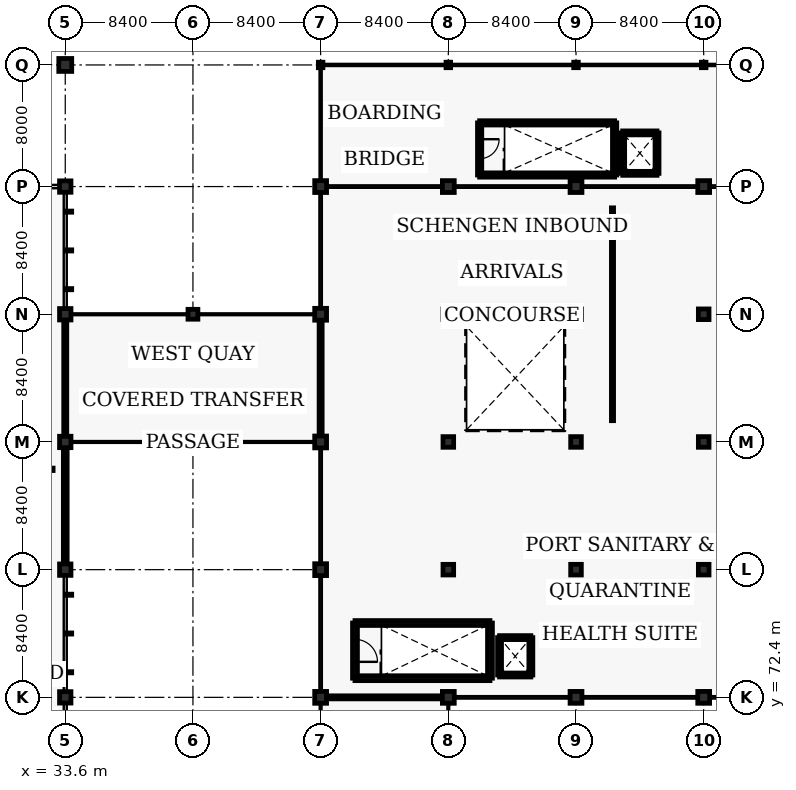
"""IFC4 building model, lengths in metres.
Left out: names, types, materials, properties, quantities, classifications, styles, units other than length and angle.
Written with IfcOpenShell. Run it as: python <this file> out.ifc"""

import sys

from ifc_helpers import new_model, si_unit, direction, frame, frame_2d, origin, origin_2d, place, context, subcontext, project, spatial, rectangle, circle, i_section, extrude, element, fill, save


model = new_model("IFC4")
c1 = context("Model", 3, precision=1e-05, world=origin(), true_north=direction((0.0, 1.0)))
c2 = subcontext(c1, "Body", "Model", "MODEL_VIEW")
j1 = project(units=[si_unit("LENGTHUNIT", "METRE"), si_unit("PLANEANGLEUNIT", "RADIAN")], contexts=[c1])
p1 = place(None, origin())
s1 = spatial("IfcSite", under=j1, at=p1, CompositionType="ELEMENT")
p2 = place(p1, origin())
s2 = spatial("IfcBuilding", under=s1, at=p2, CompositionType="ELEMENT")
p3 = place(p2, frame((0.0, 0.0, 5.44)))
s3 = spatial("IfcBuildingStorey", under=s2, at=p3, CompositionType="ELEMENT", Elevation=5.44)
for number, where, z_axis, x_axis in (
    (1, (42.0, 89.2, 0.0), (0.0, 0.0, 1.0), (1.0, 0.0, 0.0)),
    (2, (42.0, 97.6, 0.0), (0.0, 0.0, 1.0), (1.0, 0.0, 0.0)),
):
    element("IfcColumn", number, at=place(p3, frame(where, z_axis=z_axis, x_axis=x_axis)), inside=s3, PredefinedType="COLUMN", context=c2, shape_type="SweptSolid", body=[
        extrude(circle(Radius=0.325, at=origin_2d()), origin(), (0.0, 0.0, 1.0), 4.16),
    ])
for number, where, z_axis, x_axis in (
    (3, (33.6, 72.4, 0.0), (0.0, 0.0, 1.0), (1.0, 0.0, 0.0)),
    (4, (33.6, 80.8, 0.0), (0.0, 0.0, 1.0), (1.0, 0.0, 0.0)),
    (5, (33.6, 89.2, 0.0), (0.0, 0.0, 1.0), (1.0, 0.0, 0.0)),
    (6, (33.6, 97.6, 0.0), (0.0, 0.0, 1.0), (1.0, 0.0, 0.0)),
    (7, (33.6, 106.0, 0.0), (0.0, 0.0, 1.0), (1.0, 0.0, 0.0)),
):
    element("IfcColumn", number, at=place(p3, frame(where, z_axis=z_axis, x_axis=x_axis)), inside=s3, PredefinedType="COLUMN", context=c2, shape_type="SweptSolid", body=[
        extrude(rectangle(XDim=0.75, YDim=0.75, at=origin_2d()), origin(), (0.0, 0.0, 1.0), 4.16),
    ])
p4 = place(p3, frame((33.6, 114.0, 0.0), z_axis=(0.0, 0.0, 1.0), x_axis=(1.0, 0.0, 0.0)))
e8 = element("IfcColumn", 8, at=p4, inside=s3, PredefinedType="COLUMN", context=c2, shape_type="SweptSolid", body=[
    extrude(circle(Radius=0.425, at=origin_2d()), origin(), (0.0, 0.0, 1.0), 4.16),
])
for number, where, z_axis, x_axis in (
    (9, (50.4, 72.4, 0.0), (0.0, 0.0, 1.0), (1.0, 0.0, 0.0)),
    (10, (50.4, 80.8, 0.0), (0.0, 0.0, 1.0), (1.0, 0.0, 0.0)),
    (11, (50.4, 89.2, 0.0), (0.0, 0.0, 1.0), (1.0, 0.0, 0.0)),
    (12, (50.4, 97.6, 0.0), (0.0, 0.0, 1.0), (1.0, 0.0, 0.0)),
    (13, (50.4, 106.0, 0.0), (0.0, 0.0, 1.0), (1.0, 0.0, 0.0)),
    (14, (58.8, 72.4, 0.0), (0.0, 0.0, 1.0), (1.0, 0.0, 0.0)),
):
    element("IfcColumn", number, at=place(p3, frame(where, z_axis=z_axis, x_axis=x_axis)), inside=s3, PredefinedType="COLUMN", context=c2, shape_type="SweptSolid", body=[
        extrude(circle(Radius=0.39, at=origin_2d()), origin(), (0.0, 0.0, 1.0), 4.16),
    ])
for number, where, z_axis, x_axis in (
    (15, (58.8, 80.8, 0.0), (0.0, 0.0, 1.0), (1.0, 0.0, 0.0)),
    (16, (58.8, 89.2, 0.0), (0.0, 0.0, 1.0), (1.0, 0.0, 0.0)),
    (17, (58.8, 97.6, 0.0), (0.0, 0.0, 1.0), (1.0, 0.0, 0.0)),
):
    element("IfcColumn", number, at=place(p3, frame(where, z_axis=z_axis, x_axis=x_axis)), inside=s3, PredefinedType="COLUMN", context=c2, shape_type="SweptSolid", body=[
        extrude(rectangle(XDim=0.7, YDim=0.7, at=origin_2d()), origin(), (0.0, 0.0, 1.0), 4.16),
    ])
for number, where, z_axis, x_axis in (
    (18, (58.8, 106.0, 0.0), (0.0, 0.0, 1.0), (1.0, 0.0, 0.0)),
    (19, (67.2, 72.4, 0.0), (0.0, 0.0, 1.0), (1.0, 0.0, 0.0)),
):
    element("IfcColumn", number, at=place(p3, frame(where, z_axis=z_axis, x_axis=x_axis)), inside=s3, PredefinedType="COLUMN", context=c2, shape_type="SweptSolid", body=[
        extrude(circle(Radius=0.39, at=origin_2d()), origin(), (0.0, 0.0, 1.0), 4.16),
    ])
for number, where, z_axis, x_axis in (
    (20, (67.2, 80.8, 0.0), (0.0, 0.0, 1.0), (1.0, 0.0, 0.0)),
    (21, (67.2, 89.2, 0.0), (0.0, 0.0, 1.0), (1.0, 0.0, 0.0)),
    (22, (67.2, 97.6, 0.0), (0.0, 0.0, 1.0), (1.0, 0.0, 0.0)),
):
    element("IfcColumn", number, at=place(p3, frame(where, z_axis=z_axis, x_axis=x_axis)), inside=s3, PredefinedType="COLUMN", context=c2, shape_type="SweptSolid", body=[
        extrude(rectangle(XDim=0.7, YDim=0.7, at=origin_2d()), origin(), (0.0, 0.0, 1.0), 4.16),
    ])
for number, where, z_axis, x_axis in (
    (23, (67.2, 106.0, 0.0), (0.0, 0.0, 1.0), (1.0, 0.0, 0.0)),
    (24, (75.6, 72.4, 0.0), (0.0, 0.0, 1.0), (1.0, 0.0, 0.0)),
):
    element("IfcColumn", number, at=place(p3, frame(where, z_axis=z_axis, x_axis=x_axis)), inside=s3, PredefinedType="COLUMN", context=c2, shape_type="SweptSolid", body=[
        extrude(circle(Radius=0.39, at=origin_2d()), origin(), (0.0, 0.0, 1.0), 4.16),
    ])
for number, where, z_axis, x_axis in (
    (25, (75.6, 80.8, 0.0), (0.0, 0.0, 1.0), (1.0, 0.0, 0.0)),
    (26, (75.6, 89.2, 0.0), (0.0, 0.0, 1.0), (1.0, 0.0, 0.0)),
    (27, (75.6, 97.6, 0.0), (0.0, 0.0, 1.0), (1.0, 0.0, 0.0)),
):
    element("IfcColumn", number, at=place(p3, frame(where, z_axis=z_axis, x_axis=x_axis)), inside=s3, PredefinedType="COLUMN", context=c2, shape_type="SweptSolid", body=[
        extrude(rectangle(XDim=0.7, YDim=0.7, at=origin_2d()), origin(), (0.0, 0.0, 1.0), 4.16),
    ])
p5 = place(p3, frame((75.6, 106.0, 0.0), z_axis=(0.0, 0.0, 1.0), x_axis=(1.0, 0.0, 0.0)))
e28 = element("IfcColumn", 28, at=p5, inside=s3, PredefinedType="COLUMN", context=c2, shape_type="SweptSolid", body=[
    extrude(circle(Radius=0.39, at=origin_2d()), origin(), (0.0, 0.0, 1.0), 4.16),
])
for number, where, z_axis, x_axis in (
    (29, (50.4, 114.0, 0.0), (0.0, 0.0, 1.0), (1.0, 0.0, 0.0)),
    (30, (58.8, 114.0, 0.0), (0.0, 0.0, 1.0), (1.0, 0.0, 0.0)),
    (31, (67.2, 114.0, 0.0), (0.0, 0.0, 1.0), (1.0, 0.0, 0.0)),
    (32, (75.6, 114.0, 0.0), (0.0, 0.0, 1.0), (1.0, 0.0, 0.0)),
):
    element("IfcColumn", number, at=place(p3, frame(where, z_axis=z_axis, x_axis=x_axis)), inside=s3, PredefinedType="COLUMN", context=c2, shape_type="SweptSolid", body=[
        extrude(i_section(OverallWidth=0.3, OverallDepth=0.36, WebThickness=0.012, FlangeThickness=0.022, FilletRadius=0.027, at=origin_2d()), origin(), (0.0, 0.0, 1.0), 5.468),
    ])
p6 = place(p3, frame((33.6, 81.175, 0.0), z_axis=(0.0, 0.0, 1.0), x_axis=(0.0, 1.0, 0.0)))
e33 = element("IfcWall", 33, at=p6, inside=s3, PredefinedType="SOLIDWALL", context=c2, shape_type="SweptSolid", body=[
    extrude(rectangle(XDim=7.65, YDim=0.25, at=frame_2d((3.825, 0.0))), origin(), (0.0, 0.0, 1.0), 3.515),
])
for number, where, z_axis, x_axis in (
    (34, (52.66, 73.66, 0.0), (0.0, 0.0, 1.0), (1.0, 0.0, 0.0)),
    (35, (52.66, 77.29, 0.0), (0.0, 0.0, 1.0), (1.0, 0.0, 0.0)),
):
    element("IfcWall", number, at=place(p3, frame(where, z_axis=z_axis, x_axis=x_axis)), inside=s3, PredefinedType="SHEAR", context=c2, shape_type="SweptSolid", body=[
        extrude(rectangle(XDim=8.88, YDim=0.32, at=frame_2d((4.44, 0.0))), origin(), (0.0, 0.0, 1.0), 4.16),
    ])
p7 = place(p3, frame((52.66, 77.29, 0.0), z_axis=(0.0, 0.0, 1.0), x_axis=(0.0, -1.0, 0.0)))
e36 = element("IfcWall", 36, at=p7, inside=s3, PredefinedType="SHEAR", context=c2, shape_type="SweptSolid", body=[
    extrude(rectangle(XDim=3.63, YDim=0.32, at=frame_2d((1.815, 0.0))), origin(), (0.0, 0.0, 1.0), 4.16),
])
p8 = place(p7, frame((1.075, 0.0, 0.0)))
e37 = element("IfcOpeningElement", 37, at=p8, cuts=e36, PredefinedType="OPENING", context=c2, shape_type="SweptSolid", body=[
    extrude(rectangle(XDim=1.48, YDim=2.15, at=frame_2d((0.74, 1.075))), frame((0.0, 0.17, 0.0), z_axis=(0.0, -1.0, 0.0), x_axis=(1.0, 0.0, 0.0)), (0.0, 0.0, 1.0), 0.34),
])
p9 = place(p3, frame((61.54, 73.66, 0.0), z_axis=(0.0, 0.0, 1.0), x_axis=(0.0, 1.0, 0.0)))
e38 = element("IfcWall", 38, at=p9, inside=s3, PredefinedType="SHEAR", context=c2, shape_type="SweptSolid", body=[
    extrude(rectangle(XDim=3.63, YDim=0.32, at=frame_2d((1.815, 0.0))), origin(), (0.0, 0.0, 1.0), 4.16),
])
p10 = place(p3, frame((62.17, 73.87, 0.0), z_axis=(0.0, 0.0, 1.0), x_axis=(1.0, 0.0, 0.0)))
e39 = element("IfcWall", 39, at=p10, inside=s3, PredefinedType="SHEAR", context=c2, shape_type="SweptSolid", body=[
    extrude(rectangle(XDim=2.06, YDim=0.26, at=frame_2d((1.03, 0.0))), origin(), (0.0, 0.0, 1.0), 4.16),
])
for number, where, z_axis, x_axis in (
    (40, (64.23, 73.87, 0.0), (0.0, 0.0, 1.0), (0.0, 1.0, 0.0)),
    (41, (62.17, 76.33, 0.0), (0.0, 0.0, 1.0), (0.0, -1.0, 0.0)),
):
    element("IfcWall", number, at=place(p3, frame(where, z_axis=z_axis, x_axis=x_axis)), inside=s3, PredefinedType="SHEAR", context=c2, shape_type="SweptSolid", body=[
        extrude(rectangle(XDim=2.46, YDim=0.26, at=frame_2d((1.23, 0.0))), origin(), (0.0, 0.0, 1.0), 4.16),
    ])
p11 = place(p3, frame((62.17, 76.33, 0.0), z_axis=(0.0, 0.0, 1.0), x_axis=(1.0, 0.0, 0.0)))
e42 = element("IfcWall", 42, at=p11, inside=s3, PredefinedType="SHEAR", context=c2, shape_type="SweptSolid", body=[
    extrude(rectangle(XDim=2.06, YDim=0.26, at=frame_2d((1.03, 0.0))), origin(), (0.0, 0.0, 1.0), 4.16),
])
p12 = place(p11, frame((0.46, 0.0, 0.0)))
e43 = element("IfcOpeningElement", 43, at=p12, cuts=e42, PredefinedType="OPENING", context=c2, shape_type="SweptSolid", body=[
    extrude(rectangle(XDim=1.14, YDim=2.14, at=frame_2d((0.57, 1.07))), frame((0.0, 0.14, 0.0), z_axis=(0.0, -1.0, 0.0), x_axis=(1.0, 0.0, 0.0)), (0.0, 0.0, 1.0), 0.28),
])
for number, where, z_axis, x_axis in (
    (44, (60.86, 106.76, 0.0), (0.0, 0.0, 1.0), (1.0, 0.0, 0.0)),
    (45, (60.86, 110.19, 0.0), (0.0, 0.0, 1.0), (1.0, 0.0, 0.0)),
):
    element("IfcWall", number, at=place(p3, frame(where, z_axis=z_axis, x_axis=x_axis)), inside=s3, PredefinedType="SHEAR", context=c2, shape_type="SweptSolid", body=[
        extrude(rectangle(XDim=8.88, YDim=0.28, at=frame_2d((4.44, 0.0))), origin(), (0.0, 0.0, 1.0), 3.98),
    ])
p13 = place(p3, frame((60.86, 110.19, 0.0), z_axis=(0.0, 0.0, 1.0), x_axis=(0.0, -1.0, 0.0)))
e46 = element("IfcWall", 46, at=p13, inside=s3, PredefinedType="SHEAR", context=c2, shape_type="SweptSolid", body=[
    extrude(rectangle(XDim=3.43, YDim=0.28, at=frame_2d((1.715, 0.0))), origin(), (0.0, 0.0, 1.0), 3.98),
])
p14 = place(p13, frame((1.075, 0.0, 0.0)))
e47 = element("IfcOpeningElement", 47, at=p14, cuts=e46, PredefinedType="OPENING", context=c2, shape_type="SweptSolid", body=[
    extrude(rectangle(XDim=1.28, YDim=2.1, at=frame_2d((0.64, 1.05))), frame((0.0, 0.15, 0.0), z_axis=(0.0, -1.0, 0.0), x_axis=(1.0, 0.0, 0.0)), (0.0, 0.0, 1.0), 0.3),
])
p15 = place(p3, frame((69.74, 106.76, 0.0), z_axis=(0.0, 0.0, 1.0), x_axis=(0.0, 1.0, 0.0)))
e48 = element("IfcWall", 48, at=p15, inside=s3, PredefinedType="SHEAR", context=c2, shape_type="SweptSolid", body=[
    extrude(rectangle(XDim=3.43, YDim=0.28, at=frame_2d((1.715, 0.0))), origin(), (0.0, 0.0, 1.0), 3.98),
])
p16 = place(p3, frame((70.27, 106.87, 0.0), z_axis=(0.0, 0.0, 1.0), x_axis=(1.0, 0.0, 0.0)))
e49 = element("IfcWall", 49, at=p16, inside=s3, PredefinedType="SHEAR", context=c2, shape_type="SweptSolid", body=[
    extrude(rectangle(XDim=2.26, YDim=0.26, at=frame_2d((1.13, 0.0))), origin(), (0.0, 0.0, 1.0), 3.98),
])
for number, where, z_axis, x_axis in (
    (50, (72.53, 106.87, 0.0), (0.0, 0.0, 1.0), (0.0, 1.0, 0.0)),
    (51, (70.27, 109.53, 0.0), (0.0, 0.0, 1.0), (0.0, -1.0, 0.0)),
):
    element("IfcWall", number, at=place(p3, frame(where, z_axis=z_axis, x_axis=x_axis)), inside=s3, PredefinedType="SHEAR", context=c2, shape_type="SweptSolid", body=[
        extrude(rectangle(XDim=2.66, YDim=0.26, at=frame_2d((1.33, 0.0))), origin(), (0.0, 0.0, 1.0), 3.98),
    ])
p17 = place(p3, frame((70.27, 109.53, 0.0), z_axis=(0.0, 0.0, 1.0), x_axis=(1.0, 0.0, 0.0)))
e52 = element("IfcWall", 52, at=p17, inside=s3, PredefinedType="SHEAR", context=c2, shape_type="SweptSolid", body=[
    extrude(rectangle(XDim=2.26, YDim=0.26, at=frame_2d((1.13, 0.0))), origin(), (0.0, 0.0, 1.0), 3.98),
])
p18 = place(p17, frame((0.51, 0.0, 0.0)))
e53 = element("IfcOpeningElement", 53, at=p18, cuts=e52, PredefinedType="OPENING", context=c2, shape_type="SweptSolid", body=[
    extrude(rectangle(XDim=1.24, YDim=2.14, at=frame_2d((0.62, 1.07))), frame((0.0, 0.14, 0.0), z_axis=(0.0, -1.0, 0.0), x_axis=(1.0, 0.0, 0.0)), (0.0, 0.0, 1.0), 0.28),
])
p19 = place(p3, frame((35.71, 91.31, 0.0), z_axis=(0.0, 0.0, 1.0), x_axis=(1.0, 0.0, 0.0)))
e54 = element("IfcWall", 54, at=p19, inside=s3, PredefinedType="SOLIDWALL", context=c2, shape_type="SweptSolid", body=[
    extrude(rectangle(XDim=1.08, YDim=0.18, at=frame_2d((0.54, 0.0))), origin(), (0.0, 0.0, 1.0), 2.6),
])
p20 = place(p3, frame((36.79, 91.31, 0.0), z_axis=(0.0, 0.0, 1.0), x_axis=(0.0, 1.0, 0.0)))
e55 = element("IfcWall", 55, at=p20, inside=s3, PredefinedType="SOLIDWALL", context=c2, shape_type="SweptSolid", body=[
    extrude(rectangle(XDim=1.08, YDim=0.18, at=frame_2d((0.54, 0.0))), origin(), (0.0, 0.0, 1.0), 2.6),
])
p21 = place(p3, frame((36.79, 92.39, 0.0), z_axis=(0.0, 0.0, 1.0), x_axis=(-1.0, 0.0, 0.0)))
e56 = element("IfcWall", 56, at=p21, inside=s3, PredefinedType="SOLIDWALL", context=c2, shape_type="SweptSolid", body=[
    extrude(rectangle(XDim=1.08, YDim=0.18, at=frame_2d((0.54, 0.0))), origin(), (0.0, 0.0, 1.0), 2.6),
])
p22 = place(p3, frame((35.71, 92.39, 0.0), z_axis=(0.0, 0.0, 1.0), x_axis=(0.0, -1.0, 0.0)))
e57 = element("IfcWall", 57, at=p22, inside=s3, PredefinedType="SOLIDWALL", context=c2, shape_type="SweptSolid", body=[
    extrude(rectangle(XDim=1.08, YDim=0.18, at=frame_2d((0.54, 0.0))), origin(), (0.0, 0.0, 1.0), 2.6),
])
p23 = place(p3, frame((17.6, 87.4, 0.0), z_axis=(0.0, 0.0, 1.0), x_axis=(1.0, 0.0, 0.0)))
e58 = element("IfcWall", 58, at=p23, inside=s3, PredefinedType="PARTITIONING", context=c2, shape_type="SweptSolid", body=[
    extrude(rectangle(XDim=15.2, YDim=0.16, at=frame_2d((7.6, 0.0))), origin(), (0.0, 0.0, 1.0), 2.9),
])
p24 = place(p23, frame((2.5, 0.0, 0.0)))
e59 = element("IfcOpeningElement", 59, at=p24, cuts=e58, PredefinedType="OPENING", context=c2, shape_type="SweptSolid", body=[
    extrude(rectangle(XDim=1.68, YDim=2.18, at=frame_2d((0.84, 1.09))), frame((0.0, 0.09, 0.0), z_axis=(0.0, -1.0, 0.0), x_axis=(1.0, 0.0, 0.0)), (0.0, 0.0, 1.0), 0.18),
])
p25 = place(p3, frame((69.6, 90.6, 0.0), z_axis=(0.0, 0.0, 1.0), x_axis=(0.0, 1.0, 0.0)))
e60 = element("IfcWall", 60, at=p25, inside=s3, PredefinedType="PARTITIONING", context=c2, shape_type="SweptSolid", body=[
    extrude(rectangle(XDim=14.0, YDim=0.14, at=frame_2d((7.0, 0.0))), origin(), (0.0, 0.0, 1.0), 2.9),
])
p26 = place(p25, frame((2.4, 0.0, 0.0)))
e61 = element("IfcOpeningElement", 61, at=p26, cuts=e60, PredefinedType="OPENING", context=c2, shape_type="SweptSolid", body=[
    extrude(rectangle(XDim=1.96, YDim=2.22, at=frame_2d((0.98, 1.11))), frame((0.0, 0.08, 0.0), z_axis=(0.0, -1.0, 0.0), x_axis=(1.0, 0.0, 0.0)), (0.0, 0.0, 1.0), 0.16),
])
p27 = place(p3, frame((33.6, 89.65, 0.0), z_axis=(0.0, 0.0, 1.0), x_axis=(0.0, 1.0, 0.0)))
e62 = element("IfcWall", 62, at=p27, inside=s3, PredefinedType="SOLIDWALL", context=c2, shape_type="SweptSolid", body=[
    extrude(rectangle(XDim=7.5, YDim=0.2, at=frame_2d((3.75, 0.0))), origin(), (0.0, 0.0, 1.0), 3.515),
])
p28 = place(p27, frame((2.5, 0.0, 0.0)))
e63 = element("IfcOpeningElement", 63, at=p28, cuts=e62, PredefinedType="OPENING", context=c2, shape_type="SweptSolid", body=[
    extrude(rectangle(XDim=2.1, YDim=2.22, at=frame_2d((1.05, 1.11))), frame((0.0, 0.11, 0.0), z_axis=(0.0, -1.0, 0.0), x_axis=(1.0, 0.0, 0.0)), (0.0, 0.0, 1.0), 0.22),
])
p29 = place(p3, frame((50.4, 89.65, 0.0), z_axis=(0.0, 0.0, 1.0), x_axis=(0.0, 1.0, 0.0)))
e64 = element("IfcWall", 64, at=p29, inside=s3, PredefinedType="SOLIDWALL", context=c2, shape_type="SweptSolid", body=[
    extrude(rectangle(XDim=7.5, YDim=0.2, at=frame_2d((3.75, 0.0))), origin(), (0.0, 0.0, 1.0), 3.665),
])
p30 = place(p29, frame((2.5, 0.0, 0.0)))
e65 = element("IfcOpeningElement", 65, at=p30, cuts=e64, PredefinedType="OPENING", context=c2, shape_type="SweptSolid", body=[
    extrude(rectangle(XDim=2.1, YDim=2.22, at=frame_2d((1.05, 1.11))), frame((0.0, 0.11, 0.0), z_axis=(0.0, -1.0, 0.0), x_axis=(1.0, 0.0, 0.0)), (0.0, 0.0, 1.0), 0.22),
])
p31 = place(p3, frame((50.85, 72.4, 0.0), z_axis=(0.0, 0.0, 1.0), x_axis=(1.0, 0.0, 0.0)))
e66 = element("IfcWall", 66, at=p31, inside=s3, PredefinedType="SOLIDWALL", context=c2, shape_type="SweptSolid", body=[
    extrude(rectangle(XDim=7.5, YDim=0.2, at=frame_2d((3.75, 0.0))), origin(), (0.0, 0.0, 1.0), 3.665),
])
p32 = place(p31, frame((2.5, 0.0, 0.0)))
e67 = element("IfcOpeningElement", 67, at=p32, cuts=e66, PredefinedType="OPENING", context=c2, shape_type="SweptSolid", body=[
    extrude(rectangle(XDim=2.1, YDim=2.22, at=frame_2d((1.05, 1.11))), frame((0.0, 0.11, 0.0), z_axis=(0.0, -1.0, 0.0), x_axis=(1.0, 0.0, 0.0)), (0.0, 0.0, 1.0), 0.22),
])
p33 = place(p8, origin())
e68 = element("IfcDoor", 68, at=p33, inside=s3, OperationType="SINGLE_SWING_RIGHT", PredefinedType="DOOR", context=c2, shape_type="SweptSolid", body=[
    extrude(rectangle(XDim=1.48, YDim=2.15, at=frame_2d((0.74, 1.075))), frame((0.0, 0.025, 0.0), z_axis=(0.0, -1.0, 0.0), x_axis=(1.0, 0.0, 0.0)), (0.0, 0.0, 1.0), 0.05),
])
fill(e37, e68)
p34 = place(p12, origin())
e69 = element("IfcDoor", 69, at=p34, inside=s3, OperationType="DOUBLE_DOOR_SLIDING", PredefinedType="DOOR", context=c2, shape_type="SweptSolid", body=[
    extrude(rectangle(XDim=1.14, YDim=2.14, at=frame_2d((0.57, 1.07))), frame((0.0, 0.025, 0.0), z_axis=(0.0, -1.0, 0.0), x_axis=(1.0, 0.0, 0.0)), (0.0, 0.0, 1.0), 0.05),
])
fill(e43, e69)
p35 = place(p14, origin())
e70 = element("IfcDoor", 70, at=p35, inside=s3, OperationType="SINGLE_SWING_LEFT", PredefinedType="DOOR", context=c2, shape_type="SweptSolid", body=[
    extrude(rectangle(XDim=1.28, YDim=2.1, at=frame_2d((0.64, 1.05))), frame((0.0, 0.025, 0.0), z_axis=(0.0, -1.0, 0.0), x_axis=(1.0, 0.0, 0.0)), (0.0, 0.0, 1.0), 0.05),
])
fill(e47, e70)
p36 = place(p18, origin())
e71 = element("IfcDoor", 71, at=p36, inside=s3, OperationType="DOUBLE_DOOR_SLIDING", PredefinedType="DOOR", context=c2, shape_type="SweptSolid", body=[
    extrude(rectangle(XDim=1.24, YDim=2.14, at=frame_2d((0.62, 1.07))), frame((0.0, 0.025, 0.0), z_axis=(0.0, -1.0, 0.0), x_axis=(1.0, 0.0, 0.0)), (0.0, 0.0, 1.0), 0.05),
])
fill(e53, e71)
p37 = place(p26, origin())
e72 = element("IfcDoor", 72, at=p37, inside=s3, OperationType="DOUBLE_DOOR_SLIDING", PredefinedType="DOOR", context=c2, shape_type="SweptSolid", body=[
    extrude(rectangle(XDim=1.96, YDim=2.22, at=frame_2d((0.98, 1.11))), frame((0.0, 0.025, 0.0), z_axis=(0.0, -1.0, 0.0), x_axis=(1.0, 0.0, 0.0)), (0.0, 0.0, 1.0), 0.05),
])
fill(e61, e72)
p38 = place(p28, origin())
e73 = element("IfcDoor", 73, at=p38, inside=s3, OperationType="DOUBLE_DOOR_SLIDING", PredefinedType="DOOR", context=c2, shape_type="SweptSolid", body=[
    extrude(rectangle(XDim=2.1, YDim=2.22, at=frame_2d((1.05, 1.11))), frame((0.0, 0.025, 0.0), z_axis=(0.0, -1.0, 0.0), x_axis=(1.0, 0.0, 0.0)), (0.0, 0.0, 1.0), 0.05),
])
fill(e63, e73)
p39 = place(p30, origin())
e74 = element("IfcDoor", 74, at=p39, inside=s3, OperationType="DOUBLE_DOOR_SLIDING", PredefinedType="DOOR", context=c2, shape_type="SweptSolid", body=[
    extrude(rectangle(XDim=2.1, YDim=2.22, at=frame_2d((1.05, 1.11))), frame((0.0, 0.025, 0.0), z_axis=(0.0, -1.0, 0.0), x_axis=(1.0, 0.0, 0.0)), (0.0, 0.0, 1.0), 0.05),
])
fill(e65, e74)
p40 = place(p32, origin())
e75 = element("IfcDoor", 75, at=p40, inside=s3, OperationType="DOUBLE_DOOR_SLIDING", PredefinedType="DOOR", context=c2, shape_type="SweptSolid", body=[
    extrude(rectangle(XDim=2.1, YDim=2.22, at=frame_2d((1.05, 1.11))), frame((0.0, 0.025, 0.0), z_axis=(0.0, -1.0, 0.0), x_axis=(1.0, 0.0, 0.0)), (0.0, 0.0, 1.0), 0.05),
])
fill(e67, e75)
save(model, sys.argv[1])
